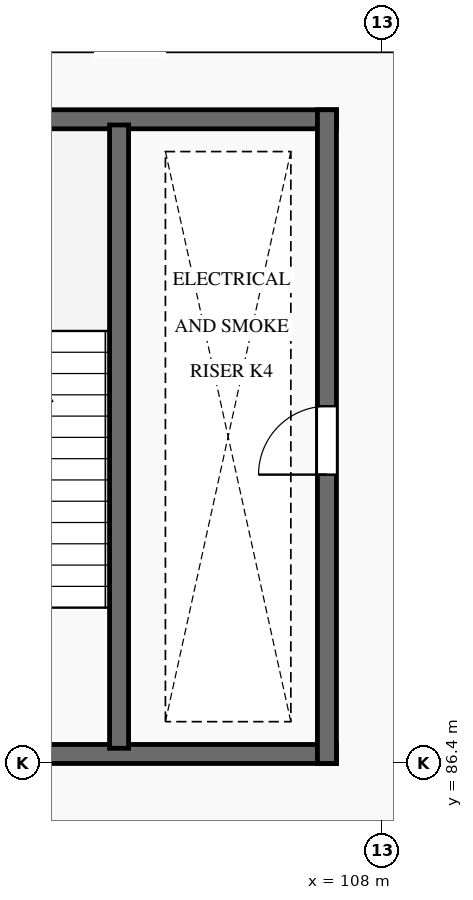
"""IFC4 building model, lengths in metres.
Left out: names, types, materials, properties, quantities, classifications, styles, units other than length and angle.
Written with IfcOpenShell. Run it as: python <this file> out.ifc"""

import sys

from ifc_helpers import new_model, si_unit, direction, frame, frame_2d, origin, place, context, subcontext, project, spatial, rectangle, extrude, element, fill, save


model = new_model("IFC4")
c1 = context("Model", 3, precision=1e-05, world=origin(), true_north=direction((0.0, 1.0)))
c2 = subcontext(c1, "Body", "Model", "MODEL_VIEW")
j1 = project(units=[si_unit("LENGTHUNIT", "METRE"), si_unit("PLANEANGLEUNIT", "RADIAN")], contexts=[c1])
p1 = place(None, origin())
s1 = spatial("IfcSite", under=j1, at=p1, CompositionType="ELEMENT")
p2 = place(p1, origin())
s2 = spatial("IfcBuilding", under=s1, at=p2, CompositionType="ELEMENT")
p3 = place(p2, frame((0.0, 0.0, 6.0)))
s3 = spatial("IfcBuildingStorey", under=s2, at=p3, CompositionType="ELEMENT", Elevation=6.0)
for number, where, z_axis, x_axis in (
    (1, (100.4, 86.525, 0.0), (0.0, 0.0, 1.0), (1.0, 0.0, 0.0)),
    (2, (100.4, 94.875, 0.0), (0.0, 0.0, 1.0), (1.0, 0.0, 0.0)),
):
    element("IfcWall", number, at=place(p3, frame(where, z_axis=z_axis, x_axis=x_axis)), inside=s3, PredefinedType="SHEAR", context=c2, shape_type="SweptSolid", body=[
        extrude(rectangle(XDim=7.0, YDim=0.25, at=frame_2d((3.5, 0.0))), origin(), (0.0, 0.0, 1.0), 4.8),
    ])
p4 = place(p3, frame((107.275, 86.4, 0.0), z_axis=(0.0, 0.0, 1.0), x_axis=(0.0, 1.0, 0.0)))
e3 = element("IfcWall", 3, at=p4, inside=s3, PredefinedType="SHEAR", context=c2, shape_type="SweptSolid", body=[
    extrude(rectangle(XDim=8.6, YDim=0.25, at=frame_2d((4.3, 0.0))), origin(), (0.0, 0.0, 1.0), 4.8),
])
p5 = place(p4, frame((3.8, 0.0, 0.0)))
e4 = element("IfcOpeningElement", 4, at=p5, cuts=e3, PredefinedType="OPENING", context=c2, shape_type="SweptSolid", body=[
    extrude(rectangle(XDim=0.9, YDim=2.05, at=frame_2d((0.45, 1.025))), frame((0.0, 0.14, 0.0), z_axis=(0.0, -1.0, 0.0), x_axis=(1.0, 0.0, 0.0)), (0.0, 0.0, 1.0), 0.28),
])
p6 = place(p3, frame((104.54, 86.6, 0.0), z_axis=(0.0, 0.0, 1.0), x_axis=(0.0, 1.0, 0.0)))
e5 = element("IfcWall", 5, at=p6, inside=s3, PredefinedType="SHEAR", context=c2, shape_type="SweptSolid", body=[
    extrude(rectangle(XDim=8.2, YDim=0.25, at=frame_2d((4.1, 0.0))), origin(), (0.0, 0.0, 1.0), 4.8),
])
p7 = place(p5, origin())
e6 = element("IfcDoor", 6, at=p7, inside=s3, OperationType="SINGLE_SWING_LEFT", PredefinedType="DOOR", context=c2, shape_type="SweptSolid", body=[
    extrude(rectangle(XDim=0.9, YDim=2.05, at=frame_2d((0.45, 1.025))), frame((0.0, 0.025, 0.0), z_axis=(0.0, -1.0, 0.0), x_axis=(1.0, 0.0, 0.0)), (0.0, 0.0, 1.0), 0.05),
])
fill(e4, e6)
save(model, sys.argv[1])
